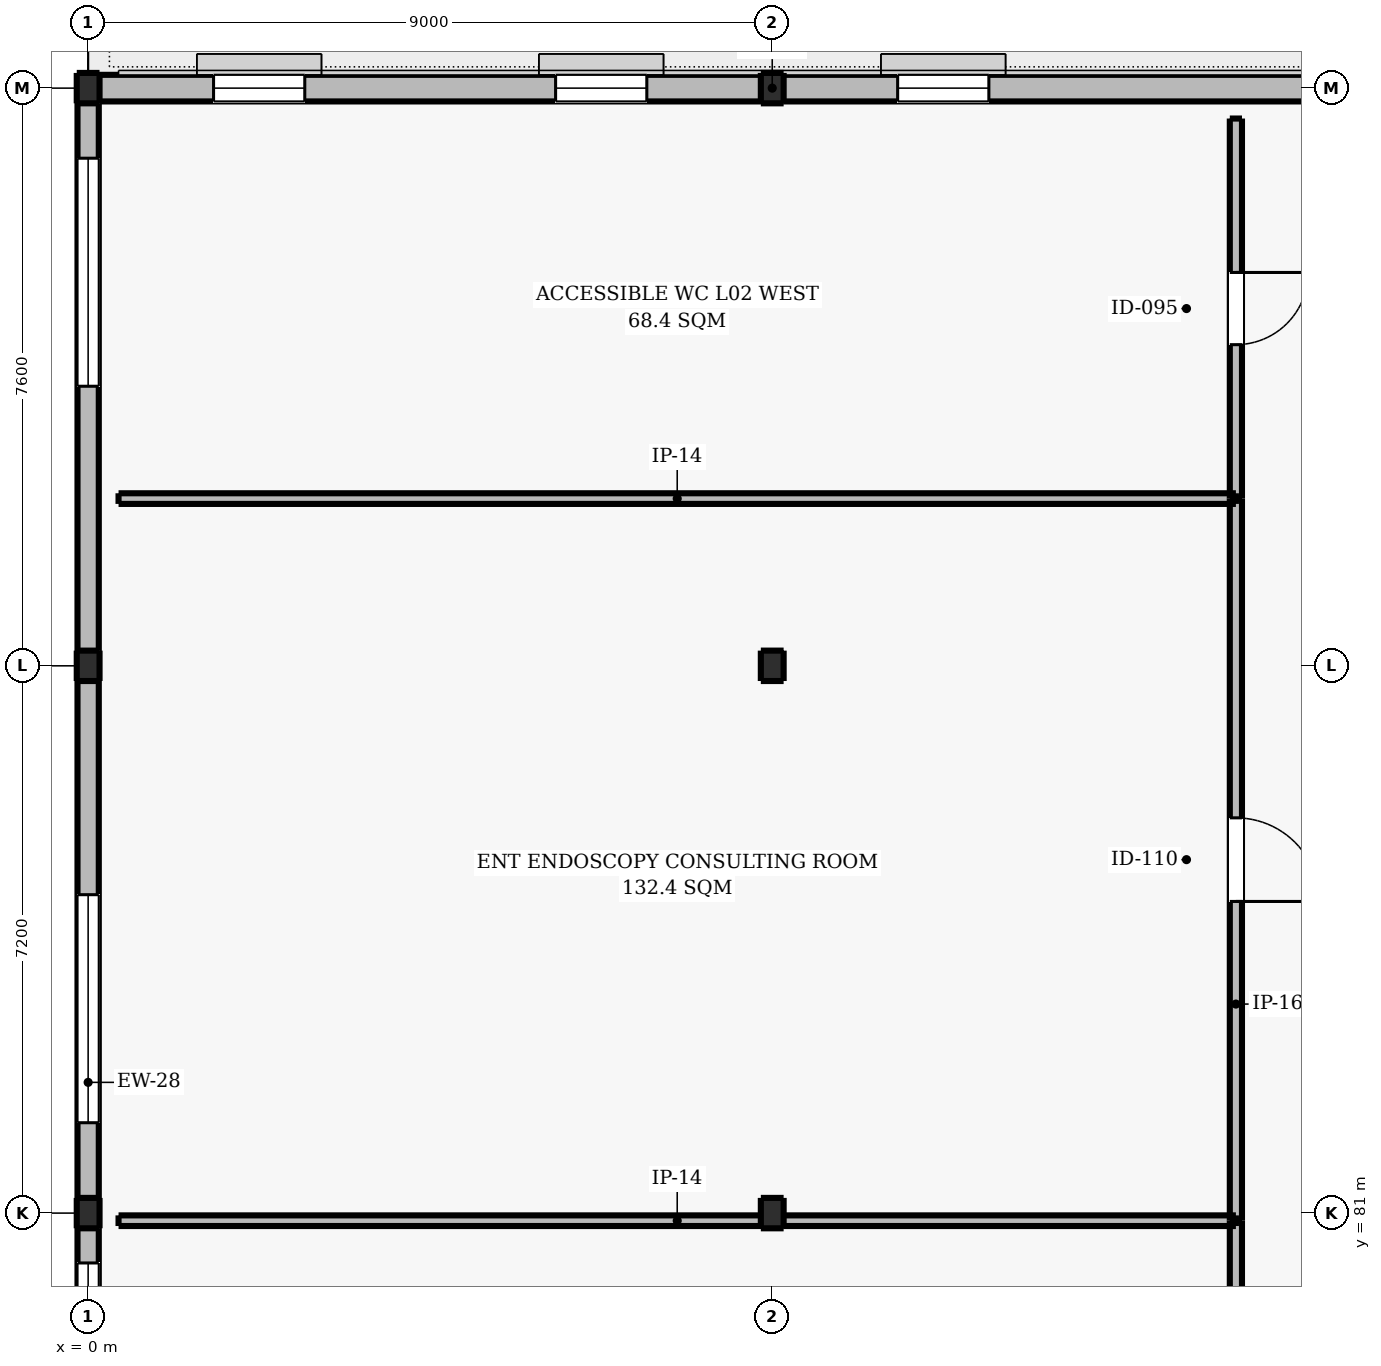
"""IFC4 building model, lengths in metres.
Left out: names, types, materials, properties, quantities, classifications, styles, units other than length and angle.
Written with IfcOpenShell. Run it as: python <this file> out.ifc"""

import sys

from ifc_helpers import new_model, si_unit, direction, frame, frame_2d, origin, origin_2d, place, context, subcontext, project, spatial, rectangle, i_section, extrude, element, fill, save


model = new_model("IFC4")
c1 = context("Model", 3, precision=1e-05, world=origin(), true_north=direction((0.0, 1.0)))
c2 = subcontext(c1, "Body", "Model", "MODEL_VIEW")
j1 = project(units=[si_unit("LENGTHUNIT", "METRE"), si_unit("PLANEANGLEUNIT", "RADIAN")], contexts=[c1])
p1 = place(None, origin())
s1 = spatial("IfcSite", under=j1, at=p1, CompositionType="ELEMENT")
p2 = place(p1, origin())
s2 = spatial("IfcBuilding", under=s1, at=p2, CompositionType="ELEMENT")
p3 = place(p2, frame((0.0, 0.0, 9.6)))
s3 = spatial("IfcBuildingStorey", under=s2, at=p3, CompositionType="ELEMENT", Elevation=9.6)
for number, where, z_axis, x_axis in (
    (1, (0.0, 81.0, 0.0), (0.0, 0.0, 1.0), (1.0, 0.0, 0.0)),
    (2, (0.0, 88.2, 0.0), (0.0, 0.0, 1.0), (1.0, 0.0, 0.0)),
    (3, (0.0, 95.8, 0.0), (0.0, 0.0, 1.0), (1.0, 0.0, 0.0)),
    (4, (9.0, 81.0, 0.0), (0.0, 0.0, 1.0), (1.0, 0.0, 0.0)),
    (5, (9.0, 88.2, 0.0), (0.0, 0.0, 1.0), (1.0, 0.0, 0.0)),
    (6, (9.0, 95.8, 0.0), (0.0, 0.0, 1.0), (1.0, 0.0, 0.0)),
):
    element("IfcColumn", number, at=place(p3, frame(where, z_axis=z_axis, x_axis=x_axis)), inside=s3, PredefinedType="COLUMN", context=c2, shape_type="SweptSolid", body=[
        extrude(i_section(OverallWidth=0.3, OverallDepth=0.4, WebThickness=0.013, FlangeThickness=0.024, FilletRadius=0.027, at=origin_2d()), origin(), (0.0, 0.0, 1.0), 4.2),
    ])
p4 = place(p3, frame((0.0, 52.2, 0.0), z_axis=(0.0, 0.0, 1.0), x_axis=(0.0, 1.0, 0.0)))
e7 = element("IfcWall", 7, at=p4, inside=s3, PredefinedType="SOLIDWALL", context=c2, shape_type="SweptSolid", body=[
    extrude(rectangle(XDim=43.6, YDim=0.28, at=frame_2d((21.8, 0.0))), origin(), (0.0, 0.0, 1.0), 3.53),
])
p5 = place(p4, frame((0.922, 0.0, 0.95)))
e8 = element("IfcOpeningElement", 8, at=p5, cuts=e7, PredefinedType="OPENING", context=c2, shape_type="SweptSolid", body=[
    extrude(rectangle(XDim=3.0, YDim=1.8, at=frame_2d((1.5, 0.9))), frame((0.0, 0.15, 0.0), z_axis=(0.0, -1.0, 0.0), x_axis=(1.0, 0.0, 0.0)), (0.0, 0.0, 1.0), 0.3),
])
p6 = place(p4, frame((5.767, 0.0, 0.95)))
e9 = element("IfcOpeningElement", 9, at=p6, cuts=e7, PredefinedType="OPENING", context=c2, shape_type="SweptSolid", body=[
    extrude(rectangle(XDim=3.0, YDim=1.8, at=frame_2d((1.5, 0.9))), frame((0.0, 0.15, 0.0), z_axis=(0.0, -1.0, 0.0), x_axis=(1.0, 0.0, 0.0)), (0.0, 0.0, 1.0), 0.3),
])
p7 = place(p4, frame((10.611, 0.0, 0.95)))
e10 = element("IfcOpeningElement", 10, at=p7, cuts=e7, PredefinedType="OPENING", context=c2, shape_type="SweptSolid", body=[
    extrude(rectangle(XDim=3.0, YDim=1.8, at=frame_2d((1.5, 0.9))), frame((0.0, 0.15, 0.0), z_axis=(0.0, -1.0, 0.0), x_axis=(1.0, 0.0, 0.0)), (0.0, 0.0, 1.0), 0.3),
])
p8 = place(p4, frame((15.456, 0.0, 0.95)))
e11 = element("IfcOpeningElement", 11, at=p8, cuts=e7, PredefinedType="OPENING", context=c2, shape_type="SweptSolid", body=[
    extrude(rectangle(XDim=3.0, YDim=1.8, at=frame_2d((1.5, 0.9))), frame((0.0, 0.15, 0.0), z_axis=(0.0, -1.0, 0.0), x_axis=(1.0, 0.0, 0.0)), (0.0, 0.0, 1.0), 0.3),
])
p9 = place(p4, frame((20.3, 0.0, 0.95)))
e12 = element("IfcOpeningElement", 12, at=p9, cuts=e7, PredefinedType="OPENING", context=c2, shape_type="SweptSolid", body=[
    extrude(rectangle(XDim=3.0, YDim=1.8, at=frame_2d((1.5, 0.9))), frame((0.0, 0.15, 0.0), z_axis=(0.0, -1.0, 0.0), x_axis=(1.0, 0.0, 0.0)), (0.0, 0.0, 1.0), 0.3),
])
p10 = place(p4, frame((25.144, 0.0, 0.95)))
e13 = element("IfcOpeningElement", 13, at=p10, cuts=e7, PredefinedType="OPENING", context=c2, shape_type="SweptSolid", body=[
    extrude(rectangle(XDim=3.0, YDim=1.8, at=frame_2d((1.5, 0.9))), frame((0.0, 0.15, 0.0), z_axis=(0.0, -1.0, 0.0), x_axis=(1.0, 0.0, 0.0)), (0.0, 0.0, 1.0), 0.3),
])
p11 = place(p4, frame((29.989, 0.0, 0.95)))
e14 = element("IfcOpeningElement", 14, at=p11, cuts=e7, PredefinedType="OPENING", context=c2, shape_type="SweptSolid", body=[
    extrude(rectangle(XDim=3.0, YDim=1.8, at=frame_2d((1.5, 0.9))), frame((0.0, 0.15, 0.0), z_axis=(0.0, -1.0, 0.0), x_axis=(1.0, 0.0, 0.0)), (0.0, 0.0, 1.0), 0.3),
])
p12 = place(p4, frame((39.678, 0.0, 0.95)))
e15 = element("IfcOpeningElement", 15, at=p12, cuts=e7, PredefinedType="OPENING", context=c2, shape_type="SweptSolid", body=[
    extrude(rectangle(XDim=3.0, YDim=1.8, at=frame_2d((1.5, 0.9))), frame((0.0, 0.15, 0.0), z_axis=(0.0, -1.0, 0.0), x_axis=(1.0, 0.0, 0.0)), (0.0, 0.0, 1.0), 0.3),
])
p13 = place(p3, frame((0.0, 95.8, 0.0), z_axis=(0.0, 0.0, 1.0), x_axis=(1.0, 0.0, 0.0)))
e16 = element("IfcWall", 16, at=p13, inside=s3, PredefinedType="SOLIDWALL", context=c2, shape_type="SweptSolid", body=[
    extrude(rectangle(XDim=18.0, YDim=0.35, at=frame_2d((9.0, 0.0))), origin(), (0.0, 0.0, 1.0), 3.48),
])
p14 = place(p13, frame((1.65, 0.0, 1.14)))
e17 = element("IfcOpeningElement", 17, at=p14, cuts=e16, PredefinedType="OPENING", context=c2, shape_type="SweptSolid", body=[
    extrude(rectangle(XDim=1.2, YDim=1.2, at=frame_2d((0.6, 0.6))), frame((0.0, 0.185, 0.0), z_axis=(0.0, -1.0, 0.0), x_axis=(1.0, 0.0, 0.0)), (0.0, 0.0, 1.0), 0.37),
])
p15 = place(p13, frame((6.15, 0.0, 1.14)))
e18 = element("IfcOpeningElement", 18, at=p15, cuts=e16, PredefinedType="OPENING", context=c2, shape_type="SweptSolid", body=[
    extrude(rectangle(XDim=1.2, YDim=1.2, at=frame_2d((0.6, 0.6))), frame((0.0, 0.185, 0.0), z_axis=(0.0, -1.0, 0.0), x_axis=(1.0, 0.0, 0.0)), (0.0, 0.0, 1.0), 0.37),
])
p16 = place(p13, frame((10.65, 0.0, 1.14)))
e19 = element("IfcOpeningElement", 19, at=p16, cuts=e16, PredefinedType="OPENING", context=c2, shape_type="SweptSolid", body=[
    extrude(rectangle(XDim=1.2, YDim=1.2, at=frame_2d((0.6, 0.6))), frame((0.0, 0.185, 0.0), z_axis=(0.0, -1.0, 0.0), x_axis=(1.0, 0.0, 0.0)), (0.0, 0.0, 1.0), 0.37),
])
p17 = place(p3, frame((15.1, 71.4, 0.0), z_axis=(0.0, 0.0, 1.0), x_axis=(0.0, 1.0, 0.0)))
e20 = element("IfcWall", 20, at=p17, inside=s3, PredefinedType="PARTITIONING", context=c2, shape_type="SweptSolid", body=[
    extrude(rectangle(XDim=9.5, YDim=0.16, at=frame_2d((4.75, 0.0))), origin(), (0.0, 0.0, 1.0), 3.53),
])
p18 = place(p17, frame((4.15, 0.0, 0.0)))
e21 = element("IfcOpeningElement", 21, at=p18, cuts=e20, PredefinedType="OPENING", context=c2, shape_type="SweptSolid", body=[
    extrude(rectangle(XDim=1.2, YDim=2.2, at=frame_2d((0.6, 1.1))), frame((0.0, 0.09, 0.0), z_axis=(0.0, -1.0, 0.0), x_axis=(1.0, 0.0, 0.0)), (0.0, 0.0, 1.0), 0.18),
])
p19 = place(p3, frame((0.4, 80.9, 0.0), z_axis=(0.0, 0.0, 1.0), x_axis=(1.0, 0.0, 0.0)))
e22 = element("IfcWall", 22, at=p19, inside=s3, PredefinedType="PARTITIONING", context=c2, shape_type="SweptSolid", body=[
    extrude(rectangle(XDim=14.7, YDim=0.14, at=frame_2d((7.35, 0.0))), origin(), (0.0, 0.0, 1.0), 3.48),
])
p20 = place(p3, frame((15.1, 80.9, 0.0), z_axis=(0.0, 0.0, 1.0), x_axis=(0.0, 1.0, 0.0)))
e23 = element("IfcWall", 23, at=p20, inside=s3, PredefinedType="PARTITIONING", context=c2, shape_type="SweptSolid", body=[
    extrude(rectangle(XDim=9.5, YDim=0.16, at=frame_2d((4.75, 0.0))), origin(), (0.0, 0.0, 1.0), 3.64),
])
p21 = place(p20, frame((4.2, 0.0, 0.0)))
e24 = element("IfcOpeningElement", 24, at=p21, cuts=e23, PredefinedType="OPENING", context=c2, shape_type="SweptSolid", body=[
    extrude(rectangle(XDim=1.1, YDim=2.15, at=frame_2d((0.55, 1.075))), frame((0.0, 0.09, 0.0), z_axis=(0.0, -1.0, 0.0), x_axis=(1.0, 0.0, 0.0)), (0.0, 0.0, 1.0), 0.18),
])
p22 = place(p3, frame((0.4, 90.4, 0.0), z_axis=(0.0, 0.0, 1.0), x_axis=(1.0, 0.0, 0.0)))
e25 = element("IfcWall", 25, at=p22, inside=s3, PredefinedType="PARTITIONING", context=c2, shape_type="SweptSolid", body=[
    extrude(rectangle(XDim=14.7, YDim=0.14, at=frame_2d((7.35, 0.0))), origin(), (0.0, 0.0, 1.0), 3.93),
])
p23 = place(p3, frame((15.1, 90.4, 0.0), z_axis=(0.0, 0.0, 1.0), x_axis=(0.0, 1.0, 0.0)))
e26 = element("IfcWall", 26, at=p23, inside=s3, PredefinedType="PARTITIONING", context=c2, shape_type="SweptSolid", body=[
    extrude(rectangle(XDim=5.0, YDim=0.16, at=frame_2d((2.5, 0.0))), origin(), (0.0, 0.0, 1.0), 3.7),
])
p24 = place(p23, frame((2.025, 0.0, 0.0)))
e27 = element("IfcOpeningElement", 27, at=p24, cuts=e26, PredefinedType="OPENING", context=c2, shape_type="SweptSolid", body=[
    extrude(rectangle(XDim=0.95, YDim=2.1, at=frame_2d((0.475, 1.05))), frame((0.0, 0.09, 0.0), z_axis=(0.0, -1.0, 0.0), x_axis=(1.0, 0.0, 0.0)), (0.0, 0.0, 1.0), 0.18),
])
p25 = place(p10, origin())
e28 = element("IfcWindow", 28, at=p25, inside=s3, PartitioningType="SINGLE_PANEL", PredefinedType="WINDOW", context=c2, shape_type="SweptSolid", body=[
    extrude(rectangle(XDim=3.0, YDim=1.8, at=frame_2d((1.5, 0.9))), frame((0.0, 0.03, 0.0), z_axis=(0.0, -1.0, 0.0), x_axis=(1.0, 0.0, 0.0)), (0.0, 0.0, 1.0), 0.06),
])
fill(e13, e28)
p26 = place(p11, origin())
e29 = element("IfcWindow", 29, at=p26, inside=s3, PartitioningType="SINGLE_PANEL", PredefinedType="WINDOW", context=c2, shape_type="SweptSolid", body=[
    extrude(rectangle(XDim=3.0, YDim=1.8, at=frame_2d((1.5, 0.9))), frame((0.0, 0.03, 0.0), z_axis=(0.0, -1.0, 0.0), x_axis=(1.0, 0.0, 0.0)), (0.0, 0.0, 1.0), 0.06),
])
fill(e14, e29)
p27 = place(p12, origin())
e30 = element("IfcWindow", 30, at=p27, inside=s3, PartitioningType="SINGLE_PANEL", PredefinedType="WINDOW", context=c2, shape_type="SweptSolid", body=[
    extrude(rectangle(XDim=3.0, YDim=1.8, at=frame_2d((1.5, 0.9))), frame((0.0, 0.03, 0.0), z_axis=(0.0, -1.0, 0.0), x_axis=(1.0, 0.0, 0.0)), (0.0, 0.0, 1.0), 0.06),
])
fill(e15, e30)
p28 = place(p14, origin())
e31 = element("IfcWindow", 31, at=p28, inside=s3, PartitioningType="SINGLE_PANEL", PredefinedType="WINDOW", context=c2, shape_type="SweptSolid", body=[
    extrude(rectangle(XDim=1.2, YDim=1.2, at=frame_2d((0.6, 0.6))), frame((0.0, 0.03, 0.0), z_axis=(0.0, -1.0, 0.0), x_axis=(1.0, 0.0, 0.0)), (0.0, 0.0, 1.0), 0.06),
])
fill(e17, e31)
p29 = place(p15, origin())
e32 = element("IfcWindow", 32, at=p29, inside=s3, PartitioningType="SINGLE_PANEL", PredefinedType="WINDOW", context=c2, shape_type="SweptSolid", body=[
    extrude(rectangle(XDim=1.2, YDim=1.2, at=frame_2d((0.6, 0.6))), frame((0.0, 0.03, 0.0), z_axis=(0.0, -1.0, 0.0), x_axis=(1.0, 0.0, 0.0)), (0.0, 0.0, 1.0), 0.06),
])
fill(e18, e32)
p30 = place(p16, origin())
e33 = element("IfcWindow", 33, at=p30, inside=s3, PartitioningType="SINGLE_PANEL", PredefinedType="WINDOW", context=c2, shape_type="SweptSolid", body=[
    extrude(rectangle(XDim=1.2, YDim=1.2, at=frame_2d((0.6, 0.6))), frame((0.0, 0.03, 0.0), z_axis=(0.0, -1.0, 0.0), x_axis=(1.0, 0.0, 0.0)), (0.0, 0.0, 1.0), 0.06),
])
fill(e19, e33)
p31 = place(p21, frame((1.1, 0.0, 0.0), z_axis=(0.0, 0.0, 1.0), x_axis=(-1.0, 0.0, 0.0)))
e34 = element("IfcDoor", 34, at=p31, inside=s3, OperationType="SINGLE_SWING_LEFT", PredefinedType="DOOR", context=c2, shape_type="SweptSolid", body=[
    extrude(rectangle(XDim=1.1, YDim=2.15, at=frame_2d((0.55, 1.075))), frame((0.0, 0.025, 0.0), z_axis=(0.0, -1.0, 0.0), x_axis=(1.0, 0.0, 0.0)), (0.0, 0.0, 1.0), 0.05),
])
fill(e24, e34)
p32 = place(p24, frame((0.95, 0.0, 0.0), z_axis=(0.0, 0.0, 1.0), x_axis=(-1.0, 0.0, 0.0)))
e35 = element("IfcDoor", 35, at=p32, inside=s3, OperationType="SINGLE_SWING_RIGHT", PredefinedType="DOOR", context=c2, shape_type="SweptSolid", body=[
    extrude(rectangle(XDim=0.95, YDim=2.1, at=frame_2d((0.475, 1.05))), frame((0.0, 0.025, 0.0), z_axis=(0.0, -1.0, 0.0), x_axis=(1.0, 0.0, 0.0)), (0.0, 0.0, 1.0), 0.05),
])
fill(e27, e35)
save(model, sys.argv[1])
